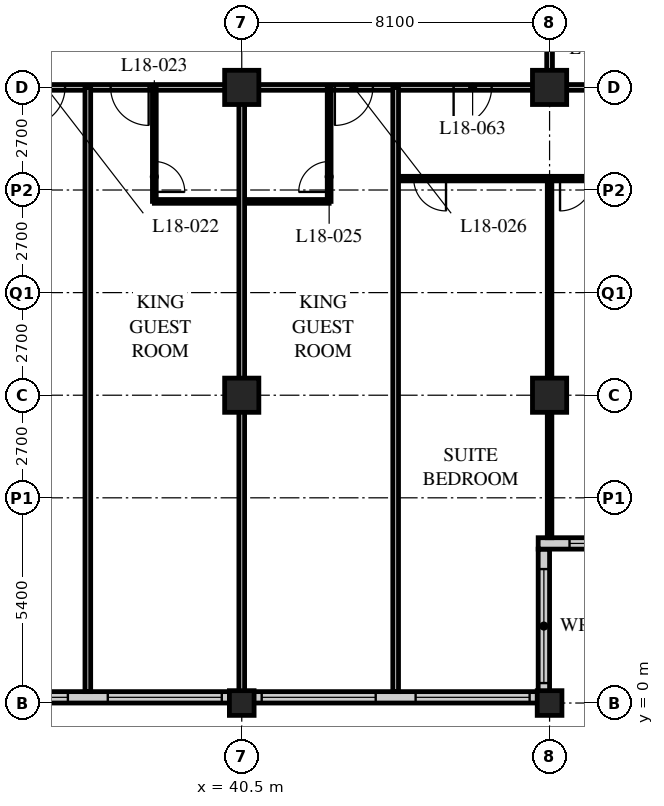
"""IFC4 building model, lengths in metres.
Left out: names, types, materials, properties, quantities, classifications, styles, units other than length and angle.
Written with IfcOpenShell. Run it as: python <this file> out.ifc"""

import sys

from ifc_helpers import new_model, si_unit, direction, frame, frame_2d, origin, origin_2d, place, context, subcontext, project, spatial, rectangle, hollow_rectangle, extrude, element, fill, save


model = new_model("IFC4")
c1 = context("Model", 3, precision=1e-05, world=origin(), true_north=direction((0.0, 1.0)))
c2 = subcontext(c1, "Body", "Model", "MODEL_VIEW")
j1 = project(units=[si_unit("LENGTHUNIT", "METRE"), si_unit("PLANEANGLEUNIT", "RADIAN")], contexts=[c1])
p1 = place(None, origin())
s1 = spatial("IfcSite", under=j1, at=p1, CompositionType="ELEMENT")
p2 = place(p1, origin())
s2 = spatial("IfcBuilding", under=s1, at=p2, CompositionType="ELEMENT")
p3 = place(p2, frame((0.0, 0.0, 73.8)))
s3 = spatial("IfcBuildingStorey", under=s2, at=p3, CompositionType="ELEMENT", Elevation=73.8)
p4 = place(p3, frame((40.5, 0.0, 0.0), z_axis=(0.0, 0.0, 1.0), x_axis=(1.0, 0.0, 0.0)))
e1 = element("IfcColumn", 1, at=p4, inside=s3, PredefinedType="COLUMN", context=c2, shape_type="SweptSolid", body=[
    extrude(hollow_rectangle(XDim=0.65, YDim=0.65, WallThickness=0.05, at=origin_2d()), origin(), (0.0, 0.0, 1.0), 3.4),
])
for number, where, z_axis, x_axis in (
    (2, (40.5, 8.1, 0.0), (0.0, 0.0, 1.0), (1.0, 0.0, 0.0)),
    (3, (40.5, 16.2, 0.0), (0.0, 0.0, 1.0), (1.0, 0.0, 0.0)),
):
    element("IfcColumn", number, at=place(p3, frame(where, z_axis=z_axis, x_axis=x_axis)), inside=s3, PredefinedType="COLUMN", context=c2, shape_type="SweptSolid", body=[
        extrude(hollow_rectangle(XDim=0.9, YDim=0.9, WallThickness=0.09, at=origin_2d()), origin(), (0.0, 0.0, 1.0), 3.4),
    ])
p5 = place(p3, frame((48.6, 0.0, 0.0), z_axis=(0.0, 0.0, 1.0), x_axis=(1.0, 0.0, 0.0)))
e4 = element("IfcColumn", 4, at=p5, inside=s3, PredefinedType="COLUMN", context=c2, shape_type="SweptSolid", body=[
    extrude(hollow_rectangle(XDim=0.65, YDim=0.65, WallThickness=0.05, at=origin_2d()), origin(), (0.0, 0.0, 1.0), 3.4),
])
for number, where, z_axis, x_axis in (
    (5, (48.6, 8.1, 0.0), (0.0, 0.0, 1.0), (1.0, 0.0, 0.0)),
    (6, (48.6, 16.2, 0.0), (0.0, 0.0, 1.0), (1.0, 0.0, 0.0)),
):
    element("IfcColumn", number, at=place(p3, frame(where, z_axis=z_axis, x_axis=x_axis)), inside=s3, PredefinedType="COLUMN", context=c2, shape_type="SweptSolid", body=[
        extrude(hollow_rectangle(XDim=0.9, YDim=0.9, WallThickness=0.09, at=origin_2d()), origin(), (0.0, 0.0, 1.0), 3.4),
    ])
p6 = place(p3, frame((8.4, 0.15, 0.0), z_axis=(0.0, 0.0, 1.0), x_axis=(1.0, 0.0, 0.0)))
e7 = element("IfcWall", 7, at=p6, inside=s3, PredefinedType="SOLIDWALL", context=c2, shape_type="SweptSolid", body=[
    extrude(rectangle(XDim=40.2, YDim=0.3, at=frame_2d((20.1, 0.0))), origin(), (0.0, 0.0, 1.0), 3.19),
])
p7 = place(p6, frame((0.225, 0.0, 0.9)))
e8 = element("IfcOpeningElement", 8, at=p7, cuts=e7, PredefinedType="OPENING", context=c2, shape_type="SweptSolid", body=[
    extrude(rectangle(XDim=3.0, YDim=2.0, at=frame_2d((1.5, 1.0))), frame((0.0, 0.16, 0.0), z_axis=(0.0, -1.0, 0.0), x_axis=(1.0, 0.0, 0.0)), (0.0, 0.0, 1.0), 0.32),
])
p8 = place(p6, frame((4.275, 0.0, 0.9)))
e9 = element("IfcOpeningElement", 9, at=p8, cuts=e7, PredefinedType="OPENING", context=c2, shape_type="SweptSolid", body=[
    extrude(rectangle(XDim=3.0, YDim=2.0, at=frame_2d((1.5, 1.0))), frame((0.0, 0.16, 0.0), z_axis=(0.0, -1.0, 0.0), x_axis=(1.0, 0.0, 0.0)), (0.0, 0.0, 1.0), 0.32),
])
p9 = place(p6, frame((8.325, 0.0, 0.9)))
e10 = element("IfcOpeningElement", 10, at=p9, cuts=e7, PredefinedType="OPENING", context=c2, shape_type="SweptSolid", body=[
    extrude(rectangle(XDim=3.0, YDim=2.0, at=frame_2d((1.5, 1.0))), frame((0.0, 0.16, 0.0), z_axis=(0.0, -1.0, 0.0), x_axis=(1.0, 0.0, 0.0)), (0.0, 0.0, 1.0), 0.32),
])
p10 = place(p6, frame((12.375, 0.0, 0.9)))
e11 = element("IfcOpeningElement", 11, at=p10, cuts=e7, PredefinedType="OPENING", context=c2, shape_type="SweptSolid", body=[
    extrude(rectangle(XDim=3.0, YDim=2.0, at=frame_2d((1.5, 1.0))), frame((0.0, 0.16, 0.0), z_axis=(0.0, -1.0, 0.0), x_axis=(1.0, 0.0, 0.0)), (0.0, 0.0, 1.0), 0.32),
])
p11 = place(p6, frame((16.425, 0.0, 0.9)))
e12 = element("IfcOpeningElement", 12, at=p11, cuts=e7, PredefinedType="OPENING", context=c2, shape_type="SweptSolid", body=[
    extrude(rectangle(XDim=3.0, YDim=2.0, at=frame_2d((1.5, 1.0))), frame((0.0, 0.16, 0.0), z_axis=(0.0, -1.0, 0.0), x_axis=(1.0, 0.0, 0.0)), (0.0, 0.0, 1.0), 0.32),
])
p12 = place(p6, frame((20.475, 0.0, 0.9)))
e13 = element("IfcOpeningElement", 13, at=p12, cuts=e7, PredefinedType="OPENING", context=c2, shape_type="SweptSolid", body=[
    extrude(rectangle(XDim=3.0, YDim=2.0, at=frame_2d((1.5, 1.0))), frame((0.0, 0.16, 0.0), z_axis=(0.0, -1.0, 0.0), x_axis=(1.0, 0.0, 0.0)), (0.0, 0.0, 1.0), 0.32),
])
p13 = place(p6, frame((24.525, 0.0, 0.9)))
e14 = element("IfcOpeningElement", 14, at=p13, cuts=e7, PredefinedType="OPENING", context=c2, shape_type="SweptSolid", body=[
    extrude(rectangle(XDim=3.0, YDim=2.0, at=frame_2d((1.5, 1.0))), frame((0.0, 0.16, 0.0), z_axis=(0.0, -1.0, 0.0), x_axis=(1.0, 0.0, 0.0)), (0.0, 0.0, 1.0), 0.32),
])
p14 = place(p6, frame((28.575, 0.0, 0.9)))
e15 = element("IfcOpeningElement", 15, at=p14, cuts=e7, PredefinedType="OPENING", context=c2, shape_type="SweptSolid", body=[
    extrude(rectangle(XDim=3.0, YDim=2.0, at=frame_2d((1.5, 1.0))), frame((0.0, 0.16, 0.0), z_axis=(0.0, -1.0, 0.0), x_axis=(1.0, 0.0, 0.0)), (0.0, 0.0, 1.0), 0.32),
])
p15 = place(p6, frame((32.625, 0.0, 0.9)))
e16 = element("IfcOpeningElement", 16, at=p15, cuts=e7, PredefinedType="OPENING", context=c2, shape_type="SweptSolid", body=[
    extrude(rectangle(XDim=3.0, YDim=2.0, at=frame_2d((1.5, 1.0))), frame((0.0, 0.16, 0.0), z_axis=(0.0, -1.0, 0.0), x_axis=(1.0, 0.0, 0.0)), (0.0, 0.0, 1.0), 0.32),
])
p16 = place(p6, frame((36.675, 0.0, 0.9)))
e17 = element("IfcOpeningElement", 17, at=p16, cuts=e7, PredefinedType="OPENING", context=c2, shape_type="SweptSolid", body=[
    extrude(rectangle(XDim=3.0, YDim=2.0, at=frame_2d((1.5, 1.0))), frame((0.0, 0.16, 0.0), z_axis=(0.0, -1.0, 0.0), x_axis=(1.0, 0.0, 0.0)), (0.0, 0.0, 1.0), 0.32),
])
p17 = place(p3, frame((48.45, 0.3, 0.0), z_axis=(0.0, 0.0, 1.0), x_axis=(0.0, 1.0, 0.0)))
e18 = element("IfcWall", 18, at=p17, inside=s3, PredefinedType="SOLIDWALL", context=c2, shape_type="SweptSolid", body=[
    extrude(rectangle(XDim=3.75, YDim=0.3, at=frame_2d((1.875, 0.0))), origin(), (0.0, 0.0, 1.0), 3.19),
])
p18 = place(p17, frame((0.225, 0.0, 0.9)))
e19 = element("IfcOpeningElement", 19, at=p18, cuts=e18, PredefinedType="OPENING", context=c2, shape_type="SweptSolid", body=[
    extrude(rectangle(XDim=3.0, YDim=1.5, at=frame_2d((1.5, 0.75))), frame((0.0, 0.16, 0.0), z_axis=(0.0, -1.0, 0.0), x_axis=(1.0, 0.0, 0.0)), (0.0, 0.0, 1.0), 0.32),
])
p19 = place(p3, frame((48.3, 4.2, 0.0), z_axis=(0.0, 0.0, 1.0), x_axis=(1.0, 0.0, 0.0)))
e20 = element("IfcWall", 20, at=p19, inside=s3, PredefinedType="SOLIDWALL", context=c2, shape_type="SweptSolid", body=[
    extrude(rectangle(XDim=4.35, YDim=0.3, at=frame_2d((2.175, 0.0))), origin(), (0.0, 0.0, 1.0), 3.19),
])
p20 = place(p19, frame((0.825, 0.0, 0.9)))
e21 = element("IfcOpeningElement", 21, at=p20, cuts=e20, PredefinedType="OPENING", context=c2, shape_type="SweptSolid", body=[
    extrude(rectangle(XDim=3.0, YDim=1.5, at=frame_2d((1.5, 0.75))), frame((0.0, 0.16, 0.0), z_axis=(0.0, -1.0, 0.0), x_axis=(1.0, 0.0, 0.0)), (0.0, 0.0, 1.0), 0.32),
])
p21 = place(p3, frame((12.15, 16.2, 0.0), z_axis=(0.0, 0.0, 1.0), x_axis=(1.0, 0.0, 0.0)))
e22 = element("IfcWall", 22, at=p21, inside=s3, PredefinedType="PARTITIONING", context=c2, shape_type="SweptSolid", body=[
    extrude(rectangle(XDim=36.45, YDim=0.15, at=frame_2d((18.225, 0.0))), origin(), (0.0, 0.0, 1.0), 2.578),
])
p22 = place(p21, frame((6.5, 0.0, 0.0)))
e23 = element("IfcOpeningElement", 23, at=p22, cuts=e22, PredefinedType="OPENING", context=c2, shape_type="SweptSolid", body=[
    extrude(rectangle(XDim=1.0, YDim=2.1, at=frame_2d((0.5, 1.05))), frame((0.0, 0.085, 0.0), z_axis=(0.0, -1.0, 0.0), x_axis=(1.0, 0.0, 0.0)), (0.0, 0.0, 1.0), 0.17),
])
p23 = place(p21, frame((8.4, 0.0, 0.0)))
e24 = element("IfcOpeningElement", 24, at=p23, cuts=e22, PredefinedType="OPENING", context=c2, shape_type="SweptSolid", body=[
    extrude(rectangle(XDim=1.0, YDim=2.1, at=frame_2d((0.5, 1.05))), frame((0.0, 0.085, 0.0), z_axis=(0.0, -1.0, 0.0), x_axis=(1.0, 0.0, 0.0)), (0.0, 0.0, 1.0), 0.17),
])
p24 = place(p21, frame((14.9, 0.0, 0.0)))
e25 = element("IfcOpeningElement", 25, at=p24, cuts=e22, PredefinedType="OPENING", context=c2, shape_type="SweptSolid", body=[
    extrude(rectangle(XDim=1.0, YDim=2.1, at=frame_2d((0.5, 1.05))), frame((0.0, 0.085, 0.0), z_axis=(0.0, -1.0, 0.0), x_axis=(1.0, 0.0, 0.0)), (0.0, 0.0, 1.0), 0.17),
])
p25 = place(p21, frame((16.5, 0.0, 0.0)))
e26 = element("IfcOpeningElement", 26, at=p25, cuts=e22, PredefinedType="OPENING", context=c2, shape_type="SweptSolid", body=[
    extrude(rectangle(XDim=1.0, YDim=2.1, at=frame_2d((0.5, 1.05))), frame((0.0, 0.085, 0.0), z_axis=(0.0, -1.0, 0.0), x_axis=(1.0, 0.0, 0.0)), (0.0, 0.0, 1.0), 0.17),
])
p26 = place(p21, frame((22.7, 0.0, 0.0)))
e27 = element("IfcOpeningElement", 27, at=p26, cuts=e22, PredefinedType="OPENING", context=c2, shape_type="SweptSolid", body=[
    extrude(rectangle(XDim=1.0, YDim=2.1, at=frame_2d((0.5, 1.05))), frame((0.0, 0.085, 0.0), z_axis=(0.0, -1.0, 0.0), x_axis=(1.0, 0.0, 0.0)), (0.0, 0.0, 1.0), 0.17),
])
p27 = place(p21, frame((24.9, 0.0, 0.0)))
e28 = element("IfcOpeningElement", 28, at=p27, cuts=e22, PredefinedType="OPENING", context=c2, shape_type="SweptSolid", body=[
    extrude(rectangle(XDim=1.0, YDim=2.1, at=frame_2d((0.5, 1.05))), frame((0.0, 0.085, 0.0), z_axis=(0.0, -1.0, 0.0), x_axis=(1.0, 0.0, 0.0)), (0.0, 0.0, 1.0), 0.17),
])
p28 = place(p21, frame((30.8, 0.0, 0.0)))
e29 = element("IfcOpeningElement", 29, at=p28, cuts=e22, PredefinedType="OPENING", context=c2, shape_type="SweptSolid", body=[
    extrude(rectangle(XDim=1.0, YDim=2.1, at=frame_2d((0.5, 1.05))), frame((0.0, 0.085, 0.0), z_axis=(0.0, -1.0, 0.0), x_axis=(1.0, 0.0, 0.0)), (0.0, 0.0, 1.0), 0.17),
])
p29 = place(p21, frame((1.525, 0.0, 0.0)))
e30 = element("IfcOpeningElement", 30, at=p29, cuts=e22, PredefinedType="OPENING", context=c2, shape_type="SweptSolid", body=[
    extrude(rectangle(XDim=1.0, YDim=2.1, at=frame_2d((0.5, 1.05))), frame((0.0, 0.085, 0.0), z_axis=(0.0, -1.0, 0.0), x_axis=(1.0, 0.0, 0.0)), (0.0, 0.0, 1.0), 0.17),
])
p30 = place(p21, frame((33.925, 0.0, 0.0)))
e31 = element("IfcOpeningElement", 31, at=p30, cuts=e22, PredefinedType="OPENING", context=c2, shape_type="SweptSolid", body=[
    extrude(rectangle(XDim=1.0, YDim=2.1, at=frame_2d((0.5, 1.05))), frame((0.0, 0.085, 0.0), z_axis=(0.0, -1.0, 0.0), x_axis=(1.0, 0.0, 0.0)), (0.0, 0.0, 1.0), 0.17),
])
p31 = place(p3, frame((48.6, 16.2, 0.0), z_axis=(0.0, 0.0, 1.0), x_axis=(0.0, 1.0, 0.0)))
e32 = element("IfcWall", 32, at=p31, inside=s3, PredefinedType="PARTITIONING", context=c2, shape_type="SweptSolid", body=[
    extrude(rectangle(XDim=26.1, YDim=0.15, at=frame_2d((13.05, 0.0))), origin(), (0.0, 0.0, 1.0), 2.578),
])
p32 = place(p31, frame((2.75, 0.0, 0.0)))
e33 = element("IfcOpeningElement", 33, at=p32, cuts=e32, PredefinedType="OPENING", context=c2, shape_type="SweptSolid", body=[
    extrude(rectangle(XDim=1.0, YDim=2.1, at=frame_2d((0.5, 1.05))), frame((0.0, 0.085, 0.0), z_axis=(0.0, -1.0, 0.0), x_axis=(1.0, 0.0, 0.0)), (0.0, 0.0, 1.0), 0.17),
])
p33 = place(p31, frame((4.65, 0.0, 0.0)))
e34 = element("IfcOpeningElement", 34, at=p33, cuts=e32, PredefinedType="OPENING", context=c2, shape_type="SweptSolid", body=[
    extrude(rectangle(XDim=1.0, YDim=2.1, at=frame_2d((0.5, 1.05))), frame((0.0, 0.085, 0.0), z_axis=(0.0, -1.0, 0.0), x_axis=(1.0, 0.0, 0.0)), (0.0, 0.0, 1.0), 0.17),
])
p34 = place(p31, frame((13.55, 0.0, 0.0)))
e35 = element("IfcOpeningElement", 35, at=p34, cuts=e32, PredefinedType="OPENING", context=c2, shape_type="SweptSolid", body=[
    extrude(rectangle(XDim=1.0, YDim=2.1, at=frame_2d((0.5, 1.05))), frame((0.0, 0.085, 0.0), z_axis=(0.0, -1.0, 0.0), x_axis=(1.0, 0.0, 0.0)), (0.0, 0.0, 1.0), 0.17),
])
p35 = place(p31, frame((21.65, 0.0, 0.0)))
e36 = element("IfcOpeningElement", 36, at=p35, cuts=e32, PredefinedType="OPENING", context=c2, shape_type="SweptSolid", body=[
    extrude(rectangle(XDim=1.0, YDim=2.1, at=frame_2d((0.5, 1.05))), frame((0.0, 0.085, 0.0), z_axis=(0.0, -1.0, 0.0), x_axis=(1.0, 0.0, 0.0)), (0.0, 0.0, 1.0), 0.17),
])
p36 = place(p3, frame((36.45, 16.2, 0.0), z_axis=(0.0, 0.0, 1.0), x_axis=(0.0, -1.0, 0.0)))
e37 = element("IfcWall", 37, at=p36, inside=s3, PredefinedType="PARTITIONING", context=c2, shape_type="SweptSolid", body=[
    extrude(rectangle(XDim=15.9, YDim=0.15, at=frame_2d((7.95, 0.0))), origin(), (0.0, 0.0, 1.0), 3.19),
])
p37 = place(p3, frame((38.2, 13.2, 0.0), z_axis=(0.0, 0.0, 1.0), x_axis=(1.0, 0.0, 0.0)))
e38 = element("IfcWall", 38, at=p37, inside=s3, PredefinedType="PARTITIONING", context=c2, shape_type="SweptSolid", body=[
    extrude(rectangle(XDim=4.6, YDim=0.1, at=frame_2d((2.3, 0.0))), origin(), (0.0, 0.0, 1.0), 3.19),
])
p38 = place(p3, frame((38.2, 16.2, 0.0), z_axis=(0.0, 0.0, 1.0), x_axis=(0.0, -1.0, 0.0)))
e39 = element("IfcWall", 39, at=p38, inside=s3, PredefinedType="PARTITIONING", context=c2, shape_type="SweptSolid", body=[
    extrude(rectangle(XDim=3.0, YDim=0.1, at=frame_2d((1.5, 0.0))), origin(), (0.0, 0.0, 1.0), 3.19),
])
p39 = place(p38, frame((1.95, 0.0, 0.0)))
e40 = element("IfcOpeningElement", 40, at=p39, cuts=e39, PredefinedType="OPENING", context=c2, shape_type="SweptSolid", body=[
    extrude(rectangle(XDim=0.8, YDim=2.1, at=frame_2d((0.4, 1.05))), frame((0.0, 0.06, 0.0), z_axis=(0.0, -1.0, 0.0), x_axis=(1.0, 0.0, 0.0)), (0.0, 0.0, 1.0), 0.12),
])
p40 = place(p3, frame((40.5, 16.2, 0.0), z_axis=(0.0, 0.0, 1.0), x_axis=(0.0, -1.0, 0.0)))
e41 = element("IfcWall", 41, at=p40, inside=s3, PredefinedType="PARTITIONING", context=c2, shape_type="SweptSolid", body=[
    extrude(rectangle(XDim=15.9, YDim=0.15, at=frame_2d((7.95, 0.0))), origin(), (0.0, 0.0, 1.0), 2.578),
])
p41 = place(p3, frame((42.8, 16.2, 0.0), z_axis=(0.0, 0.0, 1.0), x_axis=(0.0, -1.0, 0.0)))
e42 = element("IfcWall", 42, at=p41, inside=s3, PredefinedType="PARTITIONING", context=c2, shape_type="SweptSolid", body=[
    extrude(rectangle(XDim=3.0, YDim=0.1, at=frame_2d((1.5, 0.0))), origin(), (0.0, 0.0, 1.0), 3.19),
])
p42 = place(p41, frame((1.95, 0.0, 0.0)))
e43 = element("IfcOpeningElement", 43, at=p42, cuts=e42, PredefinedType="OPENING", context=c2, shape_type="SweptSolid", body=[
    extrude(rectangle(XDim=0.8, YDim=2.1, at=frame_2d((0.4, 1.05))), frame((0.0, 0.06, 0.0), z_axis=(0.0, -1.0, 0.0), x_axis=(1.0, 0.0, 0.0)), (0.0, 0.0, 1.0), 0.12),
])
p43 = place(p3, frame((44.55, 13.8, 0.0), z_axis=(0.0, 0.0, 1.0), x_axis=(1.0, 0.0, 0.0)))
e44 = element("IfcWall", 44, at=p43, inside=s3, PredefinedType="PARTITIONING", context=c2, shape_type="SweptSolid", body=[
    extrude(rectangle(XDim=8.05, YDim=0.12, at=frame_2d((4.025, 0.0))), origin(), (0.0, 0.0, 1.0), 3.19),
])
p44 = place(p43, frame((0.475, 0.0, 0.0)))
e45 = element("IfcOpeningElement", 45, at=p44, cuts=e44, PredefinedType="OPENING", context=c2, shape_type="SweptSolid", body=[
    extrude(rectangle(XDim=0.85, YDim=2.1, at=frame_2d((0.425, 1.05))), frame((0.0, 0.07, 0.0), z_axis=(0.0, -1.0, 0.0), x_axis=(1.0, 0.0, 0.0)), (0.0, 0.0, 1.0), 0.14),
])
p45 = place(p43, frame((4.325, 0.0, 0.0)))
e46 = element("IfcOpeningElement", 46, at=p45, cuts=e44, PredefinedType="OPENING", context=c2, shape_type="SweptSolid", body=[
    extrude(rectangle(XDim=0.85, YDim=2.1, at=frame_2d((0.425, 1.05))), frame((0.0, 0.07, 0.0), z_axis=(0.0, -1.0, 0.0), x_axis=(1.0, 0.0, 0.0)), (0.0, 0.0, 1.0), 0.14),
])
p46 = place(p3, frame((48.6, 13.8, 0.0), z_axis=(0.0, 0.0, 1.0), x_axis=(0.0, -1.0, 0.0)))
e47 = element("IfcWall", 47, at=p46, inside=s3, PredefinedType="PARTITIONING", context=c2, shape_type="SweptSolid", body=[
    extrude(rectangle(XDim=9.45, YDim=0.12, at=frame_2d((4.725, 0.0))), origin(), (0.0, 0.0, 1.0), 2.578),
])
p47 = place(p3, frame((48.6, 16.2, 0.0), z_axis=(0.0, 0.0, 1.0), x_axis=(1.0, 0.0, 0.0)))
e48 = element("IfcWall", 48, at=p47, inside=s3, PredefinedType="PARTITIONING", context=c2, shape_type="SweptSolid", body=[
    extrude(rectangle(XDim=7.8, YDim=0.15, at=frame_2d((3.9, 0.0))), origin(), (0.0, 0.0, 1.0), 2.578),
])
p48 = place(p3, frame((44.55, 16.2, 0.0), z_axis=(0.0, 0.0, 1.0), x_axis=(0.0, -1.0, 0.0)))
e49 = element("IfcWall", 49, at=p48, inside=s3, PredefinedType="PARTITIONING", context=c2, shape_type="SweptSolid", body=[
    extrude(rectangle(XDim=15.9, YDim=0.15, at=frame_2d((7.95, 0.0))), origin(), (0.0, 0.0, 1.0), 3.19),
])
p49 = place(p13, origin())
e50 = element("IfcWindow", 50, at=p49, inside=s3, PartitioningType="SINGLE_PANEL", PredefinedType="WINDOW", context=c2, shape_type="SweptSolid", body=[
    extrude(rectangle(XDim=3.0, YDim=2.0, at=frame_2d((1.5, 1.0))), frame((0.0, 0.03, 0.0), z_axis=(0.0, -1.0, 0.0), x_axis=(1.0, 0.0, 0.0)), (0.0, 0.0, 1.0), 0.06),
])
fill(e14, e50)
p50 = place(p14, origin())
e51 = element("IfcWindow", 51, at=p50, inside=s3, PartitioningType="SINGLE_PANEL", PredefinedType="WINDOW", context=c2, shape_type="SweptSolid", body=[
    extrude(rectangle(XDim=3.0, YDim=2.0, at=frame_2d((1.5, 1.0))), frame((0.0, 0.03, 0.0), z_axis=(0.0, -1.0, 0.0), x_axis=(1.0, 0.0, 0.0)), (0.0, 0.0, 1.0), 0.06),
])
fill(e15, e51)
p51 = place(p15, origin())
e52 = element("IfcWindow", 52, at=p51, inside=s3, PartitioningType="SINGLE_PANEL", PredefinedType="WINDOW", context=c2, shape_type="SweptSolid", body=[
    extrude(rectangle(XDim=3.0, YDim=2.0, at=frame_2d((1.5, 1.0))), frame((0.0, 0.03, 0.0), z_axis=(0.0, -1.0, 0.0), x_axis=(1.0, 0.0, 0.0)), (0.0, 0.0, 1.0), 0.06),
])
fill(e16, e52)
p52 = place(p16, origin())
e53 = element("IfcWindow", 53, at=p52, inside=s3, PartitioningType="SINGLE_PANEL", PredefinedType="WINDOW", context=c2, shape_type="SweptSolid", body=[
    extrude(rectangle(XDim=3.0, YDim=2.0, at=frame_2d((1.5, 1.0))), frame((0.0, 0.03, 0.0), z_axis=(0.0, -1.0, 0.0), x_axis=(1.0, 0.0, 0.0)), (0.0, 0.0, 1.0), 0.06),
])
fill(e17, e53)
p53 = place(p18, origin())
e54 = element("IfcWindow", 54, at=p53, inside=s3, PartitioningType="SINGLE_PANEL", PredefinedType="WINDOW", context=c2, shape_type="SweptSolid", body=[
    extrude(rectangle(XDim=3.0, YDim=1.5, at=frame_2d((1.5, 0.75))), frame((0.0, 0.03, 0.0), z_axis=(0.0, -1.0, 0.0), x_axis=(1.0, 0.0, 0.0)), (0.0, 0.0, 1.0), 0.06),
])
fill(e19, e54)
p54 = place(p20, origin())
e55 = element("IfcWindow", 55, at=p54, inside=s3, PartitioningType="SINGLE_PANEL", PredefinedType="WINDOW", context=c2, shape_type="SweptSolid", body=[
    extrude(rectangle(XDim=3.0, YDim=1.5, at=frame_2d((1.5, 0.75))), frame((0.0, 0.03, 0.0), z_axis=(0.0, -1.0, 0.0), x_axis=(1.0, 0.0, 0.0)), (0.0, 0.0, 1.0), 0.06),
])
fill(e21, e55)
p55 = place(p26, origin())
e56 = element("IfcDoor", 56, at=p55, inside=s3, OperationType="SINGLE_SWING_RIGHT", PredefinedType="DOOR", context=c2, shape_type="SweptSolid", body=[
    extrude(rectangle(XDim=1.0, YDim=2.1, at=frame_2d((0.5, 1.05))), frame((0.0, 0.025, 0.0), z_axis=(0.0, -1.0, 0.0), x_axis=(1.0, 0.0, 0.0)), (0.0, 0.0, 1.0), 0.05),
])
fill(e27, e56)
p56 = place(p39, origin())
e57 = element("IfcDoor", 57, at=p56, inside=s3, OperationType="SINGLE_SWING_RIGHT", PredefinedType="DOOR", context=c2, shape_type="SweptSolid", body=[
    extrude(rectangle(XDim=0.8, YDim=2.1, at=frame_2d((0.4, 1.05))), frame((0.0, 0.025, 0.0), z_axis=(0.0, -1.0, 0.0), x_axis=(1.0, 0.0, 0.0)), (0.0, 0.0, 1.0), 0.05),
])
fill(e40, e57)
p57 = place(p27, origin())
e58 = element("IfcDoor", 58, at=p57, inside=s3, OperationType="SINGLE_SWING_LEFT", PredefinedType="DOOR", context=c2, shape_type="SweptSolid", body=[
    extrude(rectangle(XDim=1.0, YDim=2.1, at=frame_2d((0.5, 1.05))), frame((0.0, 0.025, 0.0), z_axis=(0.0, -1.0, 0.0), x_axis=(1.0, 0.0, 0.0)), (0.0, 0.0, 1.0), 0.05),
])
fill(e28, e58)
p58 = place(p42, origin())
e59 = element("IfcDoor", 59, at=p58, inside=s3, OperationType="SINGLE_SWING_LEFT", PredefinedType="DOOR", context=c2, shape_type="SweptSolid", body=[
    extrude(rectangle(XDim=0.8, YDim=2.1, at=frame_2d((0.4, 1.05))), frame((0.0, 0.025, 0.0), z_axis=(0.0, -1.0, 0.0), x_axis=(1.0, 0.0, 0.0)), (0.0, 0.0, 1.0), 0.05),
])
fill(e43, e59)
p59 = place(p28, origin())
e60 = element("IfcDoor", 60, at=p59, inside=s3, OperationType="SINGLE_SWING_RIGHT", PredefinedType="DOOR", context=c2, shape_type="SweptSolid", body=[
    extrude(rectangle(XDim=1.0, YDim=2.1, at=frame_2d((0.5, 1.05))), frame((0.0, 0.025, 0.0), z_axis=(0.0, -1.0, 0.0), x_axis=(1.0, 0.0, 0.0)), (0.0, 0.0, 1.0), 0.05),
])
fill(e29, e60)
p60 = place(p30, origin())
e61 = element("IfcDoor", 61, at=p60, inside=s3, OperationType="SINGLE_SWING_RIGHT", PredefinedType="DOOR", context=c2, shape_type="SweptSolid", body=[
    extrude(rectangle(XDim=1.0, YDim=2.1, at=frame_2d((0.5, 1.05))), frame((0.0, 0.025, 0.0), z_axis=(0.0, -1.0, 0.0), x_axis=(1.0, 0.0, 0.0)), (0.0, 0.0, 1.0), 0.05),
])
fill(e31, e61)
p61 = place(p44, origin())
e62 = element("IfcDoor", 62, at=p61, inside=s3, OperationType="SINGLE_SWING_LEFT", PredefinedType="DOOR", context=c2, shape_type="SweptSolid", body=[
    extrude(rectangle(XDim=0.85, YDim=2.1, at=frame_2d((0.425, 1.05))), frame((0.0, 0.025, 0.0), z_axis=(0.0, -1.0, 0.0), x_axis=(1.0, 0.0, 0.0)), (0.0, 0.0, 1.0), 0.05),
])
fill(e45, e62)
p62 = place(p45, origin())
e63 = element("IfcDoor", 63, at=p62, inside=s3, OperationType="SINGLE_SWING_RIGHT", PredefinedType="DOOR", context=c2, shape_type="SweptSolid", body=[
    extrude(rectangle(XDim=0.85, YDim=2.1, at=frame_2d((0.425, 1.05))), frame((0.0, 0.025, 0.0), z_axis=(0.0, -1.0, 0.0), x_axis=(1.0, 0.0, 0.0)), (0.0, 0.0, 1.0), 0.05),
])
fill(e46, e63)
save(model, sys.argv[1])
